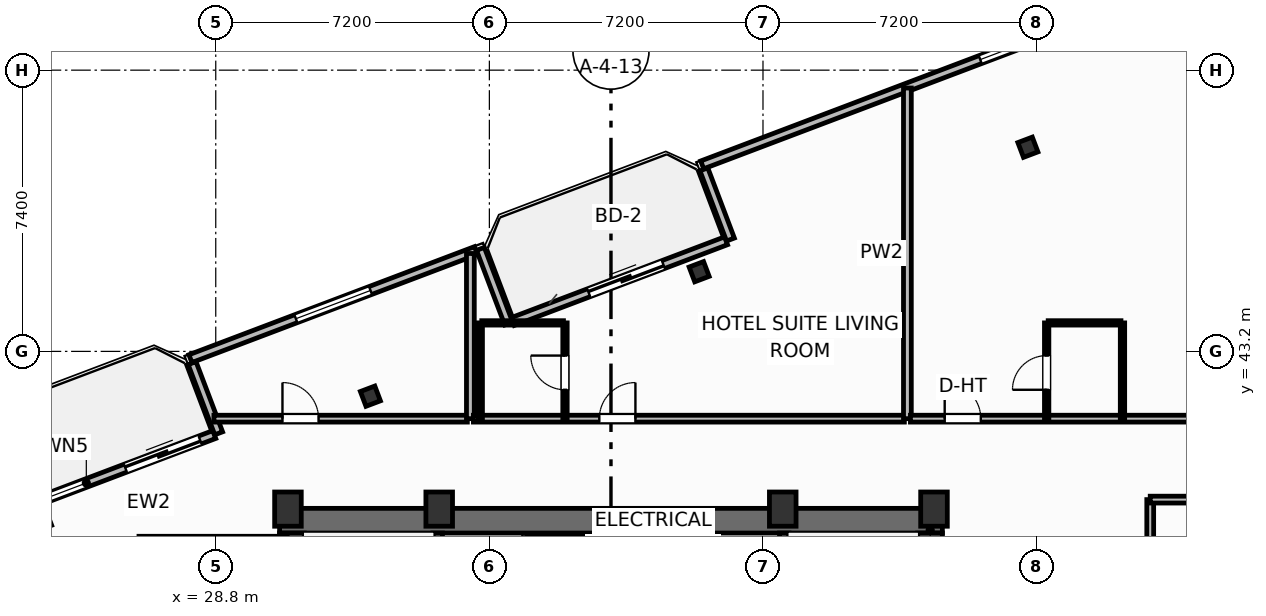
"""IFC4 building model, lengths in metres.
Left out: names, types, materials, properties, quantities, classifications, styles, units other than length and angle.
Written with IfcOpenShell. Run it as: python <this file> out.ifc"""

import sys

from ifc_helpers import new_model, si_unit, direction, frame, frame_2d, origin, origin_2d, place, context, subcontext, project, spatial, rectangle, i_section, extrude, element, fill, save


model = new_model("IFC4")
c1 = context("Model", 3, precision=1e-05, world=origin(), true_north=direction((0.0, 1.0)))
c2 = subcontext(c1, "Body", "Model", "MODEL_VIEW")
j1 = project(units=[si_unit("LENGTHUNIT", "METRE"), si_unit("PLANEANGLEUNIT", "RADIAN")], contexts=[c1])
p1 = place(None, origin())
s1 = spatial("IfcSite", under=j1, at=p1, CompositionType="ELEMENT")
p2 = place(p1, origin())
s2 = spatial("IfcBuilding", under=s1, at=p2, CompositionType="ELEMENT")
p3 = place(p2, frame((0.0, 0.0, 212.7)))
s3 = spatial("IfcBuildingStorey", under=s2, at=p3, CompositionType="ELEMENT", Elevation=212.7)
for number, where, z_axis, x_axis in (
    (1, (30.7, 39.05, 0.0), (0.0, 0.0, 1.0), (1.0, 0.0, 0.0)),
    (2, (34.68, 39.05, 0.0), (0.0, 0.0, 1.0), (1.0, 0.0, 0.0)),
    (3, (43.72, 39.05, 0.0), (0.0, 0.0, 1.0), (1.0, 0.0, 0.0)),
    (4, (47.7, 39.05, 0.0), (0.0, 0.0, 1.0), (1.0, 0.0, 0.0)),
):
    element("IfcColumn", number, at=place(p3, frame(where, z_axis=z_axis, x_axis=x_axis)), inside=s3, PredefinedType="COLUMN", context=c2, shape_type="SweptSolid", body=[
        extrude(rectangle(XDim=0.7, YDim=0.9, at=origin_2d()), origin(), (0.0, 0.0, 1.0), 3.7),
    ])
p4 = place(p3, frame((30.48, 38.745, 0.0), z_axis=(0.0, 0.0, 1.0), x_axis=(1.0, 0.0, 0.0)))
e5 = element("IfcWall", 5, at=p4, inside=s3, PredefinedType="SHEAR", context=c2, shape_type="SweptSolid", body=[
    extrude(rectangle(XDim=17.44, YDim=0.65, at=frame_2d((8.72, 0.0))), origin(), (0.0, 0.0, 1.0), 3.45),
])
for number, where, z_axis, x_axis in (
    (6, (30.805, 29.2, 0.0), (0.0, 0.0, 1.0), (0.0, 1.0, 0.0)),
    (7, (47.595, 29.2, 0.0), (0.0, 0.0, 1.0), (0.0, 1.0, 0.0)),
):
    element("IfcWall", number, at=place(p3, frame(where, z_axis=z_axis, x_axis=x_axis)), inside=s3, PredefinedType="SHEAR", context=c2, shape_type="SweptSolid", body=[
        extrude(rectangle(XDim=9.22, YDim=0.65, at=frame_2d((4.61, 0.0))), origin(), (0.0, 0.0, 1.0), 3.45),
    ])
p5 = place(p3, frame((34.64, 29.2, 0.0), z_axis=(0.0, 0.0, 1.0), x_axis=(0.0, 1.0, 0.0)))
e8 = element("IfcWall", 8, at=p5, inside=s3, PredefinedType="SHEAR", context=c2, shape_type="SweptSolid", body=[
    extrude(rectangle(XDim=9.22, YDim=0.25, at=frame_2d((4.61, 0.0))), origin(), (0.0, 0.0, 1.0), 3.45),
])
p6 = place(p5, frame((0.65, 0.0, 0.0)))
e9 = element("IfcOpeningElement", 9, at=p6, cuts=e8, PredefinedType="OPENING", context=c2, shape_type="SweptSolid", body=[
    extrude(rectangle(XDim=1.05, YDim=2.15, at=frame_2d((0.525, 1.075))), frame((0.0, 0.135, 0.0), z_axis=(0.0, -1.0, 0.0), x_axis=(1.0, 0.0, 0.0)), (0.0, 0.0, 1.0), 0.27),
])
p7 = place(p3, frame((43.76, 29.2, 0.0), z_axis=(0.0, 0.0, 1.0), x_axis=(0.0, 1.0, 0.0)))
e10 = element("IfcWall", 10, at=p7, inside=s3, PredefinedType="SHEAR", context=c2, shape_type="SweptSolid", body=[
    extrude(rectangle(XDim=9.22, YDim=0.25, at=frame_2d((4.61, 0.0))), origin(), (0.0, 0.0, 1.0), 3.45),
])
p8 = place(p7, frame((0.65, 0.0, 0.0)))
e11 = element("IfcOpeningElement", 11, at=p8, cuts=e10, PredefinedType="OPENING", context=c2, shape_type="SweptSolid", body=[
    extrude(rectangle(XDim=1.05, YDim=2.15, at=frame_2d((0.525, 1.075))), frame((0.0, 0.135, 0.0), z_axis=(0.0, -1.0, 0.0), x_axis=(1.0, 0.0, 0.0)), (0.0, 0.0, 1.0), 0.27),
])
for number, where, z_axis, x_axis in (
    (12, (50.171, 48.572, 0.0), (0.0, 0.0, 1.0), (0.935, 0.354, 0.0)),
    (13, (41.52, 45.297, 0.0), (0.0, 0.0, 1.0), (0.935, 0.354, 0.0)),
    (14, (32.869, 42.022, 0.0), (0.0, 0.0, 1.0), (0.935, 0.354, 0.0)),
):
    element("IfcColumn", number, at=place(p3, frame(where, z_axis=z_axis, x_axis=x_axis)), inside=s3, PredefinedType="COLUMN", context=c2, shape_type="SweptSolid", body=[
        extrude(i_section(OverallWidth=0.406, OverallDepth=0.416, WebThickness=0.03, FlangeThickness=0.048, FilletRadius=0.025, at=origin_2d()), origin(), (0.0, 0.0, 1.0), 3.7),
    ])
p9 = place(p3, frame((23.149, 38.887, 0.0), z_axis=(0.0, 0.0, 1.0), x_axis=(0.9352192676, 0.354069091436, 0.0)))
e15 = element("IfcWall", 15, at=p9, inside=s3, PredefinedType="SOLIDWALL", context=c2, shape_type="SweptSolid", body=[
    extrude(rectangle(XDim=6.0, YDim=0.22, at=frame_2d((3.0, 0.0))), origin(), (0.0, 0.0, 1.0), 2.73),
])
p10 = place(p9, frame((3.5, 0.0, 0.0)))
e16 = element("IfcOpeningElement", 16, at=p10, cuts=e15, PredefinedType="OPENING", context=c2, shape_type="SweptSolid", body=[
    extrude(rectangle(XDim=2.1, YDim=2.3, at=frame_2d((1.05, 1.15))), frame((0.0, 0.12, 0.0), z_axis=(0.0, -1.0, 0.0), x_axis=(1.0, 0.0, 0.0)), (0.0, 0.0, 1.0), 0.24),
])
p11 = place(p9, frame((0.55, 0.0, 0.75)))
e17 = element("IfcOpeningElement", 17, at=p11, cuts=e15, PredefinedType="OPENING", context=c2, shape_type="SweptSolid", body=[
    extrude(rectangle(XDim=1.85, YDim=1.75, at=frame_2d((0.925, 0.875))), frame((0.0, 0.12, 0.0), z_axis=(0.0, -1.0, 0.0), x_axis=(1.0, 0.0, 0.0)), (0.0, 0.0, 1.0), 0.24),
])
p12 = place(p3, frame((36.617, 43.986, 0.0), z_axis=(0.0, 0.0, 1.0), x_axis=(0.935227640088, 0.354046976001, 0.0)))
e18 = element("IfcWall", 18, at=p12, inside=s3, PredefinedType="SOLIDWALL", context=c2, shape_type="SweptSolid", body=[
    extrude(rectangle(XDim=6.0, YDim=0.22, at=frame_2d((3.0, 0.0))), origin(), (0.0, 0.0, 1.0), 2.73),
])
p13 = place(p12, frame((2.136, 0.0, 0.0)))
e19 = element("IfcOpeningElement", 19, at=p13, cuts=e18, PredefinedType="OPENING", context=c2, shape_type="SweptSolid", body=[
    extrude(rectangle(XDim=2.1, YDim=2.3, at=frame_2d((1.05, 1.15))), frame((0.0, 0.12, 0.0), z_axis=(0.0, -1.0, 0.0), x_axis=(1.0, 0.0, 0.0)), (0.0, 0.0, 1.0), 0.24),
])
p14 = place(p3, frame((58.198, 54.391, 0.0), z_axis=(0.0, 0.0, 1.0), x_axis=(-0.935223849772, -0.354056988094, 0.0)))
e20 = element("IfcWall", 20, at=p14, inside=s3, PredefinedType="SOLIDWALL", context=c2, shape_type="SweptSolid", body=[
    extrude(rectangle(XDim=17.747, YDim=0.22, at=frame_2d((8.874, 0.0))), origin(), (0.0, 0.0, 1.0), 2.73),
])
p15 = place(p14, frame((7.823, 0.0, 0.8)))
e21 = element("IfcOpeningElement", 21, at=p15, cuts=e20, PredefinedType="OPENING", context=c2, shape_type="SweptSolid", body=[
    extrude(rectangle(XDim=2.1, YDim=1.75, at=frame_2d((1.05, 0.875))), frame((0.0, 0.12, 0.0), z_axis=(0.0, -1.0, 0.0), x_axis=(1.0, 0.0, 0.0)), (0.0, 0.0, 1.0), 0.24),
])
p16 = place(p3, frame((41.645, 47.99, 0.0), z_axis=(0.0, 0.0, 1.0), x_axis=(0.354020680661, -0.935237594232, 0.0)))
e22 = element("IfcWall", 22, at=p16, inside=s3, PredefinedType="SOLIDWALL", context=c2, shape_type="SweptSolid", body=[
    extrude(rectangle(XDim=1.975, YDim=0.22, at=frame_2d((0.988, 0.0))), origin(), (0.0, 0.0, 1.0), 2.73),
])
p17 = place(p3, frame((36.508, 43.934, 0.0), z_axis=(0.0, 0.0, 1.0), x_axis=(-0.354128469405, 0.935196785258, 0.0)))
e23 = element("IfcWall", 23, at=p17, inside=s3, PredefinedType="SOLIDWALL", context=c2, shape_type="SweptSolid", body=[
    extrude(rectangle(XDim=2.1, YDim=0.22, at=frame_2d((1.05, 0.0))), origin(), (0.0, 0.0, 1.0), 2.73),
])
p18 = place(p3, frame((35.648, 45.854, 0.0), z_axis=(0.0, 0.0, 1.0), x_axis=(-0.935230796934, -0.354038636968, 0.0)))
e24 = element("IfcWall", 24, at=p18, inside=s3, PredefinedType="SOLIDWALL", context=c2, shape_type="SweptSolid", body=[
    extrude(rectangle(XDim=8.035, YDim=0.22, at=frame_2d((4.018, 0.0))), origin(), (0.0, 0.0, 1.0), 2.73),
])
p19 = place(p18, frame((2.968, 0.0, 0.8)))
e25 = element("IfcOpeningElement", 25, at=p19, cuts=e24, PredefinedType="OPENING", context=c2, shape_type="SweptSolid", body=[
    extrude(rectangle(XDim=2.1, YDim=1.75, at=frame_2d((1.05, 0.875))), frame((0.0, 0.12, 0.0), z_axis=(0.0, -1.0, 0.0), x_axis=(1.0, 0.0, 0.0)), (0.0, 0.0, 1.0), 0.24),
])
p20 = place(p3, frame((28.177, 42.892, 0.0), z_axis=(0.0, 0.0, 1.0), x_axis=(0.354061611705, -0.935222099352, 0.0)))
e26 = element("IfcWall", 26, at=p20, inside=s3, PredefinedType="SOLIDWALL", context=c2, shape_type="SweptSolid", body=[
    extrude(rectangle(XDim=1.975, YDim=0.22, at=frame_2d((0.987, 0.0))), origin(), (0.0, 0.0, 1.0), 2.73),
])
p21 = place(p3, frame((28.752, 41.43, 0.0), z_axis=(0.0, 0.0, 1.0), x_axis=(1.0, 0.0, 0.0)))
e27 = element("IfcWall", 27, at=p21, inside=s3, PredefinedType="PARTITIONING", context=c2, shape_type="SweptSolid", body=[
    extrude(rectangle(XDim=6.668, YDim=0.18, at=frame_2d((3.334, 0.0))), origin(), (0.0, 0.0, 1.0), 3.45),
])
p22 = place(p21, frame((1.803, 0.0, 0.0)))
e28 = element("IfcOpeningElement", 28, at=p22, cuts=e27, PredefinedType="OPENING", context=c2, shape_type="SweptSolid", body=[
    extrude(rectangle(XDim=0.95, YDim=2.05, at=frame_2d((0.475, 1.025))), frame((0.0, 0.1, 0.0), z_axis=(0.0, -1.0, 0.0), x_axis=(1.0, 0.0, 0.0)), (0.0, 0.0, 1.0), 0.2),
])
p23 = place(p3, frame((35.5, 41.43, 0.0), z_axis=(0.0, 0.0, 1.0), x_axis=(0.0, 1.0, 0.0)))
e29 = element("IfcWall", 29, at=p23, inside=s3, PredefinedType="PARTITIONING", context=c2, shape_type="SweptSolid", body=[
    extrude(rectangle(XDim=4.346, YDim=0.205, at=frame_2d((2.173, 0.0))), origin(), (0.0, 0.0, 1.0), 3.45),
])
p24 = place(p3, frame((35.58, 41.43, 0.0), z_axis=(0.0, 0.0, 1.0), x_axis=(1.0, 0.0, 0.0)))
e30 = element("IfcWall", 30, at=p24, inside=s3, PredefinedType="PARTITIONING", context=c2, shape_type="SweptSolid", body=[
    extrude(rectangle(XDim=11.34, YDim=0.18, at=frame_2d((5.67, 0.0))), origin(), (0.0, 0.0, 1.0), 3.018),
])
p25 = place(p24, frame((3.313, 0.0, 0.0)))
e31 = element("IfcOpeningElement", 31, at=p25, cuts=e30, PredefinedType="OPENING", context=c2, shape_type="SweptSolid", body=[
    extrude(rectangle(XDim=0.95, YDim=2.15, at=frame_2d((0.475, 1.075))), frame((0.0, 0.1, 0.0), z_axis=(0.0, -1.0, 0.0), x_axis=(1.0, 0.0, 0.0)), (0.0, 0.0, 1.0), 0.2),
])
p26 = place(p3, frame((35.8, 43.95, 0.0), z_axis=(0.0, 0.0, 1.0), x_axis=(1.0, 0.0, 0.0)))
e32 = element("IfcWall", 32, at=p26, inside=s3, PredefinedType="PARTITIONING", context=c2, shape_type="SweptSolid", body=[
    extrude(rectangle(XDim=2.15, YDim=0.115, at=frame_2d((1.075, 0.0))), origin(), (0.0, 0.0, 1.0), 3.45),
])
p27 = place(p3, frame((37.99, 41.43, 0.0), z_axis=(0.0, 0.0, 1.0), x_axis=(0.0, 1.0, 0.0)))
e33 = element("IfcWall", 33, at=p27, inside=s3, PredefinedType="PARTITIONING", context=c2, shape_type="SweptSolid", body=[
    extrude(rectangle(XDim=2.52, YDim=0.115, at=frame_2d((1.26, 0.0))), origin(), (0.0, 0.0, 1.0), 3.45),
])
p28 = place(p27, frame((0.76, 0.0, 0.0)))
e34 = element("IfcOpeningElement", 34, at=p28, cuts=e33, PredefinedType="OPENING", context=c2, shape_type="SweptSolid", body=[
    extrude(rectangle(XDim=0.9, YDim=2.05, at=frame_2d((0.45, 1.025))), frame((0.0, 0.067, 0.0), z_axis=(0.0, -1.0, 0.0), x_axis=(1.0, 0.0, 0.0)), (0.0, 0.0, 1.0), 0.135),
])
p29 = place(p3, frame((35.76, 41.43, 0.0), z_axis=(0.0, 0.0, 1.0), x_axis=(0.0, 1.0, 0.0)))
e35 = element("IfcWall", 35, at=p29, inside=s3, PredefinedType="PARTITIONING", context=c2, shape_type="SweptSolid", body=[
    extrude(rectangle(XDim=2.52, YDim=0.115, at=frame_2d((1.26, 0.0))), origin(), (0.0, 0.0, 1.0), 3.45),
])
p30 = place(p3, frame((47.0, 41.43, 0.0), z_axis=(0.0, 0.0, 1.0), x_axis=(0.0, 1.0, 0.0)))
e36 = element("IfcWall", 36, at=p30, inside=s3, PredefinedType="PARTITIONING", context=c2, shape_type="SweptSolid", body=[
    extrude(rectangle(XDim=8.7, YDim=0.205, at=frame_2d((4.35, 0.0))), origin(), (0.0, 0.0, 1.0), 3.45),
])
p31 = place(p3, frame((47.08, 41.43, 0.0), z_axis=(0.0, 0.0, 1.0), x_axis=(1.0, 0.0, 0.0)))
e37 = element("IfcWall", 37, at=p31, inside=s3, PredefinedType="PARTITIONING", context=c2, shape_type="SweptSolid", body=[
    extrude(rectangle(XDim=21.216, YDim=0.18, at=frame_2d((10.608, 0.0))), origin(), (0.0, 0.0, 1.0), 3.45),
])
p32 = place(p31, frame((0.902, 0.0, 0.0)))
e38 = element("IfcOpeningElement", 38, at=p32, cuts=e37, PredefinedType="OPENING", context=c2, shape_type="SweptSolid", body=[
    extrude(rectangle(XDim=0.95, YDim=2.15, at=frame_2d((0.475, 1.075))), frame((0.0, 0.1, 0.0), z_axis=(0.0, -1.0, 0.0), x_axis=(1.0, 0.0, 0.0)), (0.0, 0.0, 1.0), 0.2),
])
p33 = place(p3, frame((50.705, 43.95, 0.0), z_axis=(0.0, 0.0, 1.0), x_axis=(1.0, 0.0, 0.0)))
e39 = element("IfcWall", 39, at=p33, inside=s3, PredefinedType="PARTITIONING", context=c2, shape_type="SweptSolid", body=[
    extrude(rectangle(XDim=1.915, YDim=0.115, at=frame_2d((0.958, 0.0))), origin(), (0.0, 0.0, 1.0), 3.45),
])
p34 = place(p3, frame((50.665, 41.43, 0.0), z_axis=(0.0, 0.0, 1.0), x_axis=(0.0, 1.0, 0.0)))
e40 = element("IfcWall", 40, at=p34, inside=s3, PredefinedType="PARTITIONING", context=c2, shape_type="SweptSolid", body=[
    extrude(rectangle(XDim=2.52, YDim=0.115, at=frame_2d((1.26, 0.0))), origin(), (0.0, 0.0, 1.0), 3.45),
])
p35 = place(p34, frame((0.76, 0.0, 0.0)))
e41 = element("IfcOpeningElement", 41, at=p35, cuts=e40, PredefinedType="OPENING", context=c2, shape_type="SweptSolid", body=[
    extrude(rectangle(XDim=0.9, YDim=2.05, at=frame_2d((0.45, 1.025))), frame((0.0, 0.067, 0.0), z_axis=(0.0, -1.0, 0.0), x_axis=(1.0, 0.0, 0.0)), (0.0, 0.0, 1.0), 0.135),
])
p36 = place(p3, frame((52.66, 41.43, 0.0), z_axis=(0.0, 0.0, 1.0), x_axis=(0.0, 1.0, 0.0)))
e42 = element("IfcWall", 42, at=p36, inside=s3, PredefinedType="PARTITIONING", context=c2, shape_type="SweptSolid", body=[
    extrude(rectangle(XDim=2.52, YDim=0.115, at=frame_2d((1.26, 0.0))), origin(), (0.0, 0.0, 1.0), 3.45),
])
p37 = place(p3, frame((53.39, 19.24, 0.0), z_axis=(0.0, 0.0, 1.0), x_axis=(0.0, 1.0, 0.0)))
e43 = element("IfcWall", 43, at=p37, inside=s3, PredefinedType="PARTITIONING", context=c2, shape_type="SweptSolid", body=[
    extrude(rectangle(XDim=20.06, YDim=0.18, at=frame_2d((10.03, 0.0))), origin(), (0.0, 0.0, 1.0), 3.45),
])
p38 = place(p37, frame((7.7, 0.0, 0.0)))
e44 = element("IfcOpeningElement", 44, at=p38, cuts=e43, PredefinedType="OPENING", context=c2, shape_type="SweptSolid", body=[
    extrude(rectangle(XDim=0.95, YDim=2.05, at=frame_2d((0.475, 1.025))), frame((0.0, 0.1, 0.0), z_axis=(0.0, -1.0, 0.0), x_axis=(1.0, 0.0, 0.0)), (0.0, 0.0, 1.0), 0.2),
])
p39 = place(p3, frame((53.39, 39.3, 0.0), z_axis=(0.0, 0.0, 1.0), x_axis=(1.0, 0.0, 0.0)))
e45 = element("IfcWall", 45, at=p39, inside=s3, PredefinedType="PARTITIONING", context=c2, shape_type="SweptSolid", body=[
    extrude(rectangle(XDim=15.713, YDim=0.18, at=frame_2d((7.856, 0.0))), origin(), (0.0, 0.0, 1.0), 3.45),
])
p40 = place(p10, origin())
e46 = element("IfcDoor", 46, at=p40, inside=s3, OperationType="SLIDING_TO_LEFT", PredefinedType="DOOR", context=c2, shape_type="SweptSolid", body=[
    extrude(rectangle(XDim=2.1, YDim=2.3, at=frame_2d((1.05, 1.15))), frame((0.0, 0.025, 0.0), z_axis=(0.0, -1.0, 0.0), x_axis=(1.0, 0.0, 0.0)), (0.0, 0.0, 1.0), 0.05),
])
fill(e16, e46)
p41 = place(p11, origin())
e47 = element("IfcWindow", 47, at=p41, inside=s3, PartitioningType="SINGLE_PANEL", PredefinedType="WINDOW", context=c2, shape_type="SweptSolid", body=[
    extrude(rectangle(XDim=1.85, YDim=1.75, at=frame_2d((0.925, 0.875))), frame((0.0, 0.03, 0.0), z_axis=(0.0, -1.0, 0.0), x_axis=(1.0, 0.0, 0.0)), (0.0, 0.0, 1.0), 0.06),
])
fill(e17, e47)
p42 = place(p13, origin())
e48 = element("IfcDoor", 48, at=p42, inside=s3, OperationType="SLIDING_TO_LEFT", PredefinedType="DOOR", context=c2, shape_type="SweptSolid", body=[
    extrude(rectangle(XDim=2.1, YDim=2.3, at=frame_2d((1.05, 1.15))), frame((0.0, 0.025, 0.0), z_axis=(0.0, -1.0, 0.0), x_axis=(1.0, 0.0, 0.0)), (0.0, 0.0, 1.0), 0.05),
])
fill(e19, e48)
p43 = place(p15, origin())
e49 = element("IfcWindow", 49, at=p43, inside=s3, PartitioningType="SINGLE_PANEL", PredefinedType="WINDOW", context=c2, shape_type="SweptSolid", body=[
    extrude(rectangle(XDim=2.1, YDim=1.75, at=frame_2d((1.05, 0.875))), frame((0.0, 0.03, 0.0), z_axis=(0.0, -1.0, 0.0), x_axis=(1.0, 0.0, 0.0)), (0.0, 0.0, 1.0), 0.06),
])
fill(e21, e49)
p44 = place(p19, origin())
e50 = element("IfcWindow", 50, at=p44, inside=s3, PartitioningType="SINGLE_PANEL", PredefinedType="WINDOW", context=c2, shape_type="SweptSolid", body=[
    extrude(rectangle(XDim=2.1, YDim=1.75, at=frame_2d((1.05, 0.875))), frame((0.0, 0.03, 0.0), z_axis=(0.0, -1.0, 0.0), x_axis=(1.0, 0.0, 0.0)), (0.0, 0.0, 1.0), 0.06),
])
fill(e25, e50)
p45 = place(p22, origin())
e51 = element("IfcDoor", 51, at=p45, inside=s3, OperationType="SINGLE_SWING_LEFT", PredefinedType="DOOR", context=c2, shape_type="SweptSolid", body=[
    extrude(rectangle(XDim=0.95, YDim=2.05, at=frame_2d((0.475, 1.025))), frame((0.0, 0.025, 0.0), z_axis=(0.0, -1.0, 0.0), x_axis=(1.0, 0.0, 0.0)), (0.0, 0.0, 1.0), 0.05),
])
fill(e28, e51)
p46 = place(p25, origin())
e52 = element("IfcDoor", 52, at=p46, inside=s3, OperationType="SINGLE_SWING_RIGHT", PredefinedType="DOOR", context=c2, shape_type="SweptSolid", body=[
    extrude(rectangle(XDim=0.95, YDim=2.15, at=frame_2d((0.475, 1.075))), frame((0.0, 0.025, 0.0), z_axis=(0.0, -1.0, 0.0), x_axis=(1.0, 0.0, 0.0)), (0.0, 0.0, 1.0), 0.05),
])
fill(e31, e52)
p47 = place(p28, origin())
e53 = element("IfcDoor", 53, at=p47, inside=s3, OperationType="SINGLE_SWING_RIGHT", PredefinedType="DOOR", context=c2, shape_type="SweptSolid", body=[
    extrude(rectangle(XDim=0.9, YDim=2.05, at=frame_2d((0.45, 1.025))), frame((0.0, 0.025, 0.0), z_axis=(0.0, -1.0, 0.0), x_axis=(1.0, 0.0, 0.0)), (0.0, 0.0, 1.0), 0.05),
])
fill(e34, e53)
p48 = place(p32, origin())
e54 = element("IfcDoor", 54, at=p48, inside=s3, OperationType="SINGLE_SWING_LEFT", PredefinedType="DOOR", context=c2, shape_type="SweptSolid", body=[
    extrude(rectangle(XDim=0.95, YDim=2.15, at=frame_2d((0.475, 1.075))), frame((0.0, 0.025, 0.0), z_axis=(0.0, -1.0, 0.0), x_axis=(1.0, 0.0, 0.0)), (0.0, 0.0, 1.0), 0.05),
])
fill(e38, e54)
p49 = place(p35, origin())
e55 = element("IfcDoor", 55, at=p49, inside=s3, OperationType="SINGLE_SWING_LEFT", PredefinedType="DOOR", context=c2, shape_type="SweptSolid", body=[
    extrude(rectangle(XDim=0.9, YDim=2.05, at=frame_2d((0.45, 1.025))), frame((0.0, 0.025, 0.0), z_axis=(0.0, -1.0, 0.0), x_axis=(1.0, 0.0, 0.0)), (0.0, 0.0, 1.0), 0.05),
])
fill(e41, e55)
save(model, sys.argv[1])
